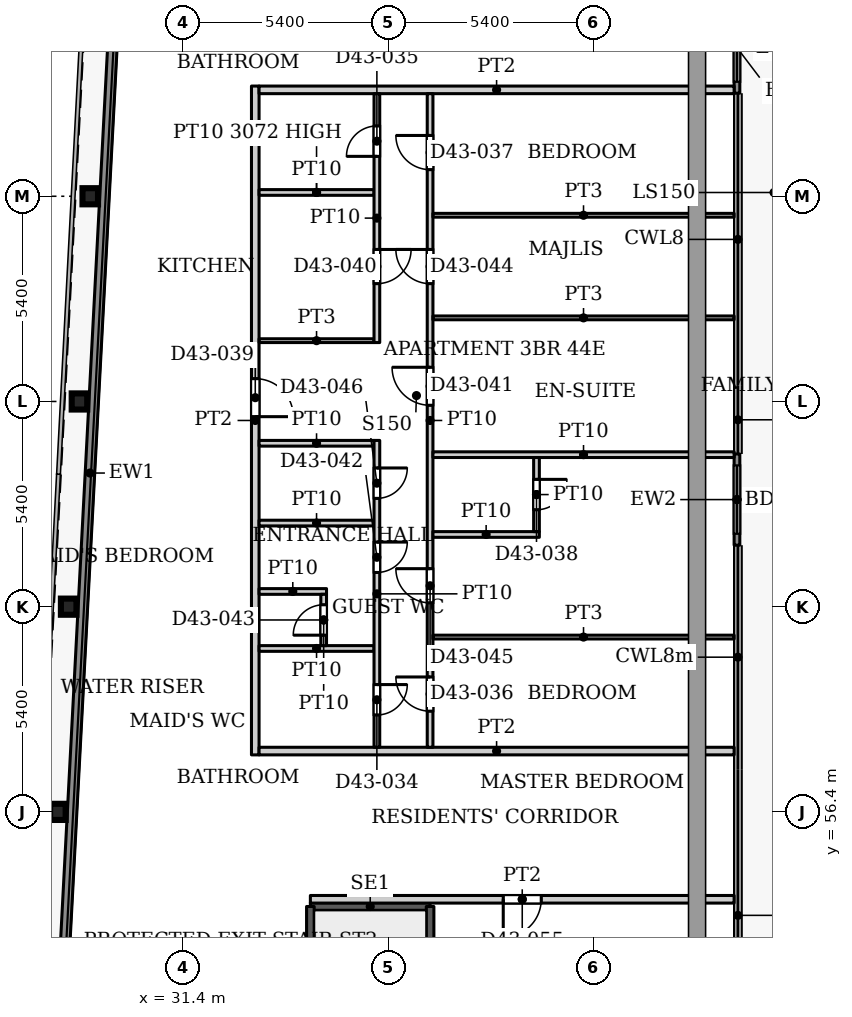
"""IFC4 building model, lengths in metres.
Left out: names, types, materials, properties, quantities, classifications, styles, units other than length and angle.
Written with IfcOpenShell. Run it as: python <this file> out.ifc"""

import sys

from ifc_helpers import new_model, si_unit, direction, frame, frame_2d, origin, origin_2d, place, context, subcontext, project, spatial, rectangle, i_section, extrude, source, transform, mapped, element, fill, save


model = new_model("IFC4")
c1 = context("Model", 3, precision=1e-05, world=origin(), true_north=direction((0.0, 1.0)))
c2 = subcontext(c1, "Body", "Model", "MODEL_VIEW")
j1 = project(units=[si_unit("LENGTHUNIT", "METRE"), si_unit("PLANEANGLEUNIT", "RADIAN")], contexts=[c1])
p1 = place(None, origin())
s1 = spatial("IfcSite", under=j1, at=p1, CompositionType="ELEMENT")
p2 = place(p1, origin())
s2 = spatial("IfcBuilding", under=s1, at=p2, CompositionType="ELEMENT")
p3 = place(p2, frame((0.0, 0.0, 187.7)))
s3 = spatial("IfcBuildingStorey", under=s2, at=p3, CompositionType="ELEMENT", Elevation=187.7)
for number, where, z_axis, x_axis in (
    (1, (28.106, 56.4, 0.0), (0.0, 0.0, 1.0), (1.0, 0.0, 0.0)),
    (2, (28.39, 61.8, 0.0), (0.0, 0.0, 1.0), (1.0, 0.0, 0.0)),
    (3, (28.674, 67.2, 0.0), (0.0, 0.0, 1.0), (1.0, 0.0, 0.0)),
    (4, (28.958, 72.6, 0.0), (0.0, 0.0, 1.0), (1.0, 0.0, 0.0)),
):
    element("IfcColumn", number, at=place(p3, frame(where, z_axis=z_axis, x_axis=x_axis)), inside=s3, PredefinedType="COLUMN", context=c2, shape_type="SweptSolid", body=[
        extrude(i_section(OverallWidth=0.409, OverallDepth=0.425, WebThickness=0.033, FlangeThickness=0.052, FilletRadius=0.013, at=origin_2d()), origin(), (0.0, 0.0, 1.0), 3.9),
    ])
p4 = place(p3, frame((27.195, 31.969, 0.0), z_axis=(0.0, 0.0, 1.0), x_axis=(0.052554995867, 0.998618031286, 0.0)))
e5 = element("IfcWall", 5, at=p4, inside=s3, PredefinedType="SOLIDWALL", context=c2, shape_type="SweptSolid", body=[
    extrude(rectangle(XDim=66.787, YDim=0.25, at=frame_2d((33.394, 0.0))), origin(), (0.0, 0.0, 1.0), 3.75),
])
p5 = place(p3, frame((45.975, 77.712, 0.0), z_axis=(0.0, 0.0, 1.0), x_axis=(0.0, -1.0, 0.0)))
e6 = element("IfcWall", 6, at=p5, inside=s3, PredefinedType="SOLIDWALL", context=c2, shape_type="SweptSolid", body=[
    extrude(rectangle(XDim=2.4, YDim=0.15, at=frame_2d((1.2, 0.0))), origin(), (0.0, 0.0, 1.0), 3.75),
])
p6 = place(p5, frame((0.3, 0.0, 0.0)))
e7 = element("IfcOpeningElement", 7, at=p6, cuts=e6, PredefinedType="OPENING", context=c2, shape_type="SweptSolid", body=[
    extrude(rectangle(XDim=1.8, YDim=2.4, at=frame_2d((0.9, 1.2))), frame((0.0, 0.085, 0.0), z_axis=(0.0, -1.0, 0.0), x_axis=(1.0, 0.0, 0.0)), (0.0, 0.0, 1.0), 0.17),
])
p7 = place(p3, frame((45.975, 65.818, 0.0), z_axis=(0.0, 0.0, 1.0), x_axis=(0.0, -1.0, 0.0)))
e8 = element("IfcWall", 8, at=p7, inside=s3, PredefinedType="SOLIDWALL", context=c2, shape_type="SweptSolid", body=[
    extrude(rectangle(XDim=2.4, YDim=0.15, at=frame_2d((1.2, 0.0))), origin(), (0.0, 0.0, 1.0), 3.75),
])
p8 = place(p7, frame((0.3, 0.0, 0.0)))
e9 = element("IfcOpeningElement", 9, at=p8, cuts=e8, PredefinedType="OPENING", context=c2, shape_type="SweptSolid", body=[
    extrude(rectangle(XDim=1.8, YDim=2.4, at=frame_2d((0.9, 1.2))), frame((0.0, 0.085, 0.0), z_axis=(0.0, -1.0, 0.0), x_axis=(1.0, 0.0, 0.0)), (0.0, 0.0, 1.0), 0.17),
])
p9 = place(p3, frame((34.75, 53.91, 0.0), z_axis=(0.0, 0.0, 1.0), x_axis=(1.0, 0.0, 0.0)))
e10 = element("IfcWall", 10, at=p9, inside=s3, PredefinedType="SHEAR", context=c2, shape_type="SweptSolid", body=[
    extrude(rectangle(XDim=3.15, YDim=0.2, at=frame_2d((1.575, 0.0))), origin(), (0.0, 0.0, 1.0), 3.9),
])
p10 = place(p3, frame((34.75, 47.5, 0.0), z_axis=(0.0, 0.0, 1.0), x_axis=(0.0, 1.0, 0.0)))
e11 = element("IfcWall", 11, at=p10, inside=s3, PredefinedType="SHEAR", context=c2, shape_type="SweptSolid", body=[
    extrude(rectangle(XDim=6.41, YDim=0.2, at=frame_2d((3.205, 0.0))), origin(), (0.0, 0.0, 1.0), 3.9),
])
p11 = place(p3, frame((37.9, 44.75, 0.0), z_axis=(0.0, 0.0, 1.0), x_axis=(0.0, 1.0, 0.0)))
e12 = element("IfcWall", 12, at=p11, inside=s3, PredefinedType="SHEAR", context=c2, shape_type="SweptSolid", body=[
    extrude(rectangle(XDim=9.16, YDim=0.2, at=frame_2d((4.58, 0.0))), origin(), (0.0, 0.0, 1.0), 3.9),
])
p12 = place(p3, frame((33.3, 57.9, 0.0), z_axis=(0.0, 0.0, 1.0), x_axis=(0.0, 1.0, 0.0)))
e13 = element("IfcWall", 13, at=p12, inside=s3, PredefinedType="PARTITIONING", context=c2, shape_type="SweptSolid", body=[
    extrude(rectangle(XDim=17.6, YDim=0.2, at=frame_2d((8.8, 0.0))), origin(), (0.0, 0.0, 1.0), 3.6),
])
p13 = place(p12, frame((8.9, 0.0, 0.0)))
e14 = element("IfcOpeningElement", 14, at=p13, cuts=e13, PredefinedType="OPENING", context=c2, shape_type="SweptSolid", body=[
    extrude(rectangle(XDim=1.0, YDim=2.1, at=frame_2d((0.5, 1.05))), frame((0.0, 0.11, 0.0), z_axis=(0.0, -1.0, 0.0), x_axis=(1.0, 0.0, 0.0)), (0.0, 0.0, 1.0), 0.22),
])
p14 = place(p3, frame((33.4, 58.0, 0.0), z_axis=(0.0, 0.0, 1.0), x_axis=(1.0, 0.0, 0.0)))
e15 = element("IfcWall", 15, at=p14, inside=s3, PredefinedType="PARTITIONING", context=c2, shape_type="SweptSolid", body=[
    extrude(rectangle(XDim=12.5, YDim=0.2, at=frame_2d((6.25, 0.0))), origin(), (0.0, 0.0, 1.0), 3.6),
])
p15 = place(p3, frame((33.4, 60.7, 0.0), z_axis=(0.0, 0.0, 1.0), x_axis=(1.0, 0.0, 0.0)))
e16 = element("IfcWall", 16, at=p15, inside=s3, PredefinedType="PARTITIONING", context=c2, shape_type="SweptSolid", body=[
    extrude(rectangle(XDim=3.025, YDim=0.15, at=frame_2d((1.513, 0.0))), origin(), (0.0, 0.0, 1.0), 3.6),
])
p16 = place(p3, frame((33.4, 62.2, 0.0), z_axis=(0.0, 0.0, 1.0), x_axis=(1.0, 0.0, 0.0)))
e17 = element("IfcWall", 17, at=p16, inside=s3, PredefinedType="PARTITIONING", context=c2, shape_type="SweptSolid", body=[
    extrude(rectangle(XDim=1.775, YDim=0.15, at=frame_2d((0.888, 0.0))), origin(), (0.0, 0.0, 1.0), 3.6),
])
for number, where, z_axis, x_axis in (
    (18, (33.4, 64.0, 0.0), (0.0, 0.0, 1.0), (1.0, 0.0, 0.0)),
    (19, (33.4, 66.1, 0.0), (0.0, 0.0, 1.0), (1.0, 0.0, 0.0)),
):
    element("IfcWall", number, at=place(p3, frame(where, z_axis=z_axis, x_axis=x_axis)), inside=s3, PredefinedType="PARTITIONING", context=c2, shape_type="SweptSolid", body=[
        extrude(rectangle(XDim=3.025, YDim=0.15, at=frame_2d((1.513, 0.0))), origin(), (0.0, 0.0, 1.0), 3.6),
    ])
p17 = place(p3, frame((33.4, 68.8, 0.0), z_axis=(0.0, 0.0, 1.0), x_axis=(1.0, 0.0, 0.0)))
e20 = element("IfcWall", 20, at=p17, inside=s3, PredefinedType="PARTITIONING", context=c2, shape_type="SweptSolid", body=[
    extrude(rectangle(XDim=3.025, YDim=0.1, at=frame_2d((1.513, 0.0))), origin(), (0.0, 0.0, 1.0), 3.6),
])
p18 = place(p3, frame((33.4, 72.7, 0.0), z_axis=(0.0, 0.0, 1.0), x_axis=(1.0, 0.0, 0.0)))
e21 = element("IfcWall", 21, at=p18, inside=s3, PredefinedType="PARTITIONING", context=c2, shape_type="SweptSolid", body=[
    extrude(rectangle(XDim=3.025, YDim=0.15, at=frame_2d((1.513, 0.0))), origin(), (0.0, 0.0, 1.0), 3.072),
])
p19 = place(p3, frame((33.4, 75.4, 0.0), z_axis=(0.0, 0.0, 1.0), x_axis=(1.0, 0.0, 0.0)))
e22 = element("IfcWall", 22, at=p19, inside=s3, PredefinedType="PARTITIONING", context=c2, shape_type="SweptSolid", body=[
    extrude(rectangle(XDim=12.5, YDim=0.2, at=frame_2d((6.25, 0.0))), origin(), (0.0, 0.0, 1.0), 3.6),
])
p20 = place(p3, frame((34.75, 54.1, 0.0), z_axis=(0.0, 0.0, 1.0), x_axis=(1.0, 0.0, 0.0)))
e23 = element("IfcWall", 23, at=p20, inside=s3, PredefinedType="PARTITIONING", context=c2, shape_type="SweptSolid", body=[
    extrude(rectangle(XDim=11.15, YDim=0.2, at=frame_2d((5.575, 0.0))), origin(), (0.0, 0.0, 1.0), 3.6),
])
p21 = place(p20, frame((5.075, 0.0, 0.0)))
e24 = element("IfcOpeningElement", 24, at=p21, cuts=e23, PredefinedType="OPENING", context=c2, shape_type="SweptSolid", body=[
    extrude(rectangle(XDim=1.0, YDim=2.1, at=frame_2d((0.5, 1.05))), frame((0.0, 0.11, 0.0), z_axis=(0.0, -1.0, 0.0), x_axis=(1.0, 0.0, 0.0)), (0.0, 0.0, 1.0), 0.22),
])
p22 = place(p3, frame((35.1, 60.775, 0.0), z_axis=(0.0, 0.0, 1.0), x_axis=(0.0, 1.0, 0.0)))
e25 = element("IfcWall", 25, at=p22, inside=s3, PredefinedType="PARTITIONING", context=c2, shape_type="SweptSolid", body=[
    extrude(rectangle(XDim=1.35, YDim=0.15, at=frame_2d((0.675, 0.0))), origin(), (0.0, 0.0, 1.0), 3.6),
])
p23 = place(p22, frame((0.275, 0.0, 0.0)))
e26 = element("IfcOpeningElement", 26, at=p23, cuts=e25, PredefinedType="OPENING", context=c2, shape_type="SweptSolid", body=[
    extrude(rectangle(XDim=0.8, YDim=2.1, at=frame_2d((0.4, 1.05))), frame((0.0, 0.085, 0.0), z_axis=(0.0, -1.0, 0.0), x_axis=(1.0, 0.0, 0.0)), (0.0, 0.0, 1.0), 0.17),
])
p24 = place(p3, frame((36.5, 58.1, 0.0), z_axis=(0.0, 0.0, 1.0), x_axis=(0.0, 1.0, 0.0)))
e27 = element("IfcWall", 27, at=p24, inside=s3, PredefinedType="PARTITIONING", context=c2, shape_type="SweptSolid", body=[
    extrude(rectangle(XDim=8.075, YDim=0.15, at=frame_2d((4.038, 0.0))), origin(), (0.0, 0.0, 1.0), 3.6),
])
p25 = place(p24, frame((0.85, 0.0, 0.0)))
e28 = element("IfcOpeningElement", 28, at=p25, cuts=e27, PredefinedType="OPENING", context=c2, shape_type="SweptSolid", body=[
    extrude(rectangle(XDim=0.8, YDim=2.1, at=frame_2d((0.4, 1.05))), frame((0.0, 0.085, 0.0), z_axis=(0.0, -1.0, 0.0), x_axis=(1.0, 0.0, 0.0)), (0.0, 0.0, 1.0), 0.17),
])
p26 = place(p24, frame((4.6, 0.0, 0.0)))
e29 = element("IfcOpeningElement", 29, at=p26, cuts=e27, PredefinedType="OPENING", context=c2, shape_type="SweptSolid", body=[
    extrude(rectangle(XDim=0.8, YDim=2.1, at=frame_2d((0.4, 1.05))), frame((0.0, 0.085, 0.0), z_axis=(0.0, -1.0, 0.0), x_axis=(1.0, 0.0, 0.0)), (0.0, 0.0, 1.0), 0.17),
])
p27 = place(p24, frame((6.55, 0.0, 0.0)))
e30 = element("IfcOpeningElement", 30, at=p27, cuts=e27, PredefinedType="OPENING", context=c2, shape_type="SweptSolid", body=[
    extrude(rectangle(XDim=0.8, YDim=2.1, at=frame_2d((0.4, 1.05))), frame((0.0, 0.085, 0.0), z_axis=(0.0, -1.0, 0.0), x_axis=(1.0, 0.0, 0.0)), (0.0, 0.0, 1.0), 0.17),
])
p28 = place(p3, frame((36.5, 68.75, 0.0), z_axis=(0.0, 0.0, 1.0), x_axis=(0.0, 1.0, 0.0)))
e31 = element("IfcWall", 31, at=p28, inside=s3, PredefinedType="PARTITIONING", context=c2, shape_type="SweptSolid", body=[
    extrude(rectangle(XDim=6.55, YDim=0.15, at=frame_2d((3.275, 0.0))), origin(), (0.0, 0.0, 1.0), 3.6),
])
p29 = place(p28, frame((4.9, 0.0, 0.0)))
e32 = element("IfcOpeningElement", 32, at=p29, cuts=e31, PredefinedType="OPENING", context=c2, shape_type="SweptSolid", body=[
    extrude(rectangle(XDim=0.8, YDim=2.1, at=frame_2d((0.4, 1.05))), frame((0.0, 0.085, 0.0), z_axis=(0.0, -1.0, 0.0), x_axis=(1.0, 0.0, 0.0)), (0.0, 0.0, 1.0), 0.17),
])
p30 = place(p28, frame((1.55, 0.0, 0.0)))
e33 = element("IfcOpeningElement", 33, at=p30, cuts=e31, PredefinedType="OPENING", context=c2, shape_type="SweptSolid", body=[
    extrude(rectangle(XDim=0.9, YDim=2.1, at=frame_2d((0.45, 1.05))), frame((0.0, 0.085, 0.0), z_axis=(0.0, -1.0, 0.0), x_axis=(1.0, 0.0, 0.0)), (0.0, 0.0, 1.0), 0.17),
])
p31 = place(p3, frame((37.9, 58.1, 0.0), z_axis=(0.0, 0.0, 1.0), x_axis=(0.0, 1.0, 0.0)))
e34 = element("IfcWall", 34, at=p31, inside=s3, PredefinedType="PARTITIONING", context=c2, shape_type="SweptSolid", body=[
    extrude(rectangle(XDim=17.2, YDim=0.15, at=frame_2d((8.6, 0.0))), origin(), (0.0, 0.0, 1.0), 3.6),
])
p32 = place(p31, frame((0.95, 0.0, 0.0)))
e35 = element("IfcOpeningElement", 35, at=p32, cuts=e34, PredefinedType="OPENING", context=c2, shape_type="SweptSolid", body=[
    extrude(rectangle(XDim=0.9, YDim=2.1, at=frame_2d((0.45, 1.05))), frame((0.0, 0.085, 0.0), z_axis=(0.0, -1.0, 0.0), x_axis=(1.0, 0.0, 0.0)), (0.0, 0.0, 1.0), 0.17),
])
p33 = place(p31, frame((15.2, 0.0, 0.0)))
e36 = element("IfcOpeningElement", 36, at=p33, cuts=e34, PredefinedType="OPENING", context=c2, shape_type="SweptSolid", body=[
    extrude(rectangle(XDim=0.9, YDim=2.1, at=frame_2d((0.45, 1.05))), frame((0.0, 0.085, 0.0), z_axis=(0.0, -1.0, 0.0), x_axis=(1.0, 0.0, 0.0)), (0.0, 0.0, 1.0), 0.17),
])
p34 = place(p31, frame((9.0, 0.0, 0.0)))
e37 = element("IfcOpeningElement", 37, at=p34, cuts=e34, PredefinedType="OPENING", context=c2, shape_type="SweptSolid", body=[
    extrude(rectangle(XDim=1.0, YDim=2.1, at=frame_2d((0.5, 1.05))), frame((0.0, 0.085, 0.0), z_axis=(0.0, -1.0, 0.0), x_axis=(1.0, 0.0, 0.0)), (0.0, 0.0, 1.0), 0.17),
])
p35 = place(p31, frame((12.2, 0.0, 0.0)))
e38 = element("IfcOpeningElement", 38, at=p35, cuts=e34, PredefinedType="OPENING", context=c2, shape_type="SweptSolid", body=[
    extrude(rectangle(XDim=0.9, YDim=2.1, at=frame_2d((0.45, 1.05))), frame((0.0, 0.085, 0.0), z_axis=(0.0, -1.0, 0.0), x_axis=(1.0, 0.0, 0.0)), (0.0, 0.0, 1.0), 0.17),
])
p36 = place(p31, frame((3.8, 0.0, 0.0)))
e39 = element("IfcOpeningElement", 39, at=p36, cuts=e34, PredefinedType="OPENING", context=c2, shape_type="SweptSolid", body=[
    extrude(rectangle(XDim=0.9, YDim=2.1, at=frame_2d((0.45, 1.05))), frame((0.0, 0.085, 0.0), z_axis=(0.0, -1.0, 0.0), x_axis=(1.0, 0.0, 0.0)), (0.0, 0.0, 1.0), 0.17),
])
p37 = place(p3, frame((37.975, 61.0, 0.0), z_axis=(0.0, 0.0, 1.0), x_axis=(1.0, 0.0, 0.0)))
e40 = element("IfcWall", 40, at=p37, inside=s3, PredefinedType="PARTITIONING", context=c2, shape_type="SweptSolid", body=[
    extrude(rectangle(XDim=7.925, YDim=0.1, at=frame_2d((3.962, 0.0))), origin(), (0.0, 0.0, 1.0), 3.6),
])
p38 = place(p3, frame((37.975, 63.7, 0.0), z_axis=(0.0, 0.0, 1.0), x_axis=(1.0, 0.0, 0.0)))
e41 = element("IfcWall", 41, at=p38, inside=s3, PredefinedType="PARTITIONING", context=c2, shape_type="SweptSolid", body=[
    extrude(rectangle(XDim=2.8, YDim=0.15, at=frame_2d((1.4, 0.0))), origin(), (0.0, 0.0, 1.0), 3.6),
])
p39 = place(p3, frame((37.975, 65.8, 0.0), z_axis=(0.0, 0.0, 1.0), x_axis=(1.0, 0.0, 0.0)))
e42 = element("IfcWall", 42, at=p39, inside=s3, PredefinedType="PARTITIONING", context=c2, shape_type="SweptSolid", body=[
    extrude(rectangle(XDim=7.925, YDim=0.15, at=frame_2d((3.962, 0.0))), origin(), (0.0, 0.0, 1.0), 3.6),
])
for number, where, z_axis, x_axis in (
    (43, (37.975, 69.4, 0.0), (0.0, 0.0, 1.0), (1.0, 0.0, 0.0)),
    (44, (37.975, 72.1, 0.0), (0.0, 0.0, 1.0), (1.0, 0.0, 0.0)),
):
    element("IfcWall", number, at=place(p3, frame(where, z_axis=z_axis, x_axis=x_axis)), inside=s3, PredefinedType="PARTITIONING", context=c2, shape_type="SweptSolid", body=[
        extrude(rectangle(XDim=7.925, YDim=0.1, at=frame_2d((3.962, 0.0))), origin(), (0.0, 0.0, 1.0), 3.6),
    ])
p40 = place(p3, frame((40.7, 63.775, 0.0), z_axis=(0.0, 0.0, 1.0), x_axis=(0.0, 1.0, 0.0)))
e45 = element("IfcWall", 45, at=p40, inside=s3, PredefinedType="PARTITIONING", context=c2, shape_type="SweptSolid", body=[
    extrude(rectangle(XDim=1.95, YDim=0.15, at=frame_2d((0.975, 0.0))), origin(), (0.0, 0.0, 1.0), 3.6),
])
p41 = place(p40, frame((0.575, 0.0, 0.0)))
e46 = element("IfcOpeningElement", 46, at=p41, cuts=e45, PredefinedType="OPENING", context=c2, shape_type="SweptSolid", body=[
    extrude(rectangle(XDim=0.8, YDim=2.1, at=frame_2d((0.4, 1.05))), frame((0.0, 0.085, 0.0), z_axis=(0.0, -1.0, 0.0), x_axis=(1.0, 0.0, 0.0)), (0.0, 0.0, 1.0), 0.17),
])
m1 = source(origin(), c2, "Body", "SweptSolid", [
    extrude(rectangle(XDim=1.8, YDim=2.4, at=frame_2d((0.9, 1.2))), frame((0.0, 0.025, 0.0), z_axis=(0.0, -1.0, 0.0), x_axis=(1.0, 0.0, 0.0)), (0.0, 0.0, 1.0), 0.05),
])
p42 = place(p6, origin())
e47 = element("IfcDoor", 47, at=p42, inside=s3, OperationType="SLIDING_TO_LEFT", PredefinedType="DOOR", context=c2, shape_type="MappedRepresentation", body=[
    mapped(m1, transform((0.0, 0.0, 0.0), x_axis=(1.0, 0.0, 0.0), y_axis=(0.0, 1.0, 0.0), z_axis=(0.0, 0.0, 1.0), scale=1.0)),
])
fill(e7, e47)
p43 = place(p8, origin())
e48 = element("IfcDoor", 48, at=p43, inside=s3, OperationType="SLIDING_TO_LEFT", PredefinedType="DOOR", context=c2, shape_type="MappedRepresentation", body=[
    mapped(m1, transform((0.0, 0.0, 0.0), x_axis=(1.0, 0.0, 0.0), y_axis=(0.0, 1.0, 0.0), z_axis=(0.0, 0.0, 1.0), scale=1.0)),
])
fill(e9, e48)
m2 = source(origin(), c2, "Body", "SweptSolid", [
    extrude(rectangle(XDim=0.8, YDim=2.1, at=frame_2d((0.4, 1.05))), frame((0.0, 0.025, 0.0), z_axis=(0.0, -1.0, 0.0), x_axis=(1.0, 0.0, 0.0)), (0.0, 0.0, 1.0), 0.05),
])
p44 = place(p25, origin())
e49 = element("IfcDoor", 49, at=p44, inside=s3, OperationType="SINGLE_SWING_RIGHT", PredefinedType="DOOR", context=c2, shape_type="MappedRepresentation", body=[
    mapped(m2, transform((0.0, 0.0, 0.0), x_axis=(1.0, 0.0, 0.0), y_axis=(0.0, 1.0, 0.0), z_axis=(0.0, 0.0, 1.0), scale=1.0)),
])
fill(e28, e49)
p45 = place(p29, origin())
e50 = element("IfcDoor", 50, at=p45, inside=s3, OperationType="SINGLE_SWING_LEFT", PredefinedType="DOOR", context=c2, shape_type="MappedRepresentation", body=[
    mapped(m2, transform((0.0, 0.0, 0.0), x_axis=(1.0, 0.0, 0.0), y_axis=(0.0, 1.0, 0.0), z_axis=(0.0, 0.0, 1.0), scale=1.0)),
])
fill(e32, e50)
m3 = source(origin(), c2, "Body", "SweptSolid", [
    extrude(rectangle(XDim=0.9, YDim=2.1, at=frame_2d((0.45, 1.05))), frame((0.0, 0.025, 0.0), z_axis=(0.0, -1.0, 0.0), x_axis=(1.0, 0.0, 0.0)), (0.0, 0.0, 1.0), 0.05),
])
p46 = place(p32, origin())
e51 = element("IfcDoor", 51, at=p46, inside=s3, OperationType="SINGLE_SWING_LEFT", PredefinedType="DOOR", context=c2, shape_type="MappedRepresentation", body=[
    mapped(m3, transform((0.0, 0.0, 0.0), x_axis=(1.0, 0.0, 0.0), y_axis=(0.0, 1.0, 0.0), z_axis=(0.0, 0.0, 1.0), scale=1.0)),
])
fill(e35, e51)
p47 = place(p33, origin())
e52 = element("IfcDoor", 52, at=p47, inside=s3, OperationType="SINGLE_SWING_LEFT", PredefinedType="DOOR", context=c2, shape_type="MappedRepresentation", body=[
    mapped(m3, transform((0.0, 0.0, 0.0), x_axis=(1.0, 0.0, 0.0), y_axis=(0.0, 1.0, 0.0), z_axis=(0.0, 0.0, 1.0), scale=1.0)),
])
fill(e36, e52)
p48 = place(p41, origin())
e53 = element("IfcDoor", 53, at=p48, inside=s3, OperationType="SINGLE_SWING_RIGHT", PredefinedType="DOOR", context=c2, shape_type="MappedRepresentation", body=[
    mapped(m2, transform((0.0, 0.0, 0.0), x_axis=(1.0, 0.0, 0.0), y_axis=(0.0, 1.0, 0.0), z_axis=(0.0, 0.0, 1.0), scale=1.0)),
])
fill(e46, e53)
m4 = source(origin(), c2, "Body", "SweptSolid", [
    extrude(rectangle(XDim=1.0, YDim=2.1, at=frame_2d((0.5, 1.05))), frame((0.0, 0.025, 0.0), z_axis=(0.0, -1.0, 0.0), x_axis=(1.0, 0.0, 0.0)), (0.0, 0.0, 1.0), 0.05),
])
p49 = place(p13, origin())
e54 = element("IfcDoor", 54, at=p49, inside=s3, OperationType="SINGLE_SWING_RIGHT", PredefinedType="DOOR", context=c2, shape_type="MappedRepresentation", body=[
    mapped(m4, transform((0.0, 0.0, 0.0), x_axis=(1.0, 0.0, 0.0), y_axis=(0.0, 1.0, 0.0), z_axis=(0.0, 0.0, 1.0), scale=1.0)),
])
fill(e14, e54)
p50 = place(p30, origin())
e55 = element("IfcDoor", 55, at=p50, inside=s3, OperationType="SINGLE_SWING_RIGHT", PredefinedType="DOOR", context=c2, shape_type="MappedRepresentation", body=[
    mapped(m3, transform((0.0, 0.0, 0.0), x_axis=(1.0, 0.0, 0.0), y_axis=(0.0, 1.0, 0.0), z_axis=(0.0, 0.0, 1.0), scale=1.0)),
])
fill(e33, e55)
m5 = source(origin(), c2, "Body", "SweptSolid", [
    extrude(rectangle(XDim=1.0, YDim=2.1, at=frame_2d((0.5, 1.05))), frame((0.0, 0.025, 0.0), z_axis=(0.0, -1.0, 0.0), x_axis=(1.0, 0.0, 0.0)), (0.0, 0.0, 1.0), 0.05),
])
p51 = place(p34, origin())
e56 = element("IfcDoor", 56, at=p51, inside=s3, OperationType="SINGLE_SWING_LEFT", PredefinedType="DOOR", context=c2, shape_type="MappedRepresentation", body=[
    mapped(m5, transform((0.0, 0.0, 0.0), x_axis=(1.0, 0.0, 0.0), y_axis=(0.0, 1.0, 0.0), z_axis=(0.0, 0.0, 1.0), scale=1.0)),
])
fill(e37, e56)
p52 = place(p26, origin())
e57 = element("IfcDoor", 57, at=p52, inside=s3, OperationType="SINGLE_SWING_RIGHT", PredefinedType="DOOR", context=c2, shape_type="MappedRepresentation", body=[
    mapped(m2, transform((0.0, 0.0, 0.0), x_axis=(1.0, 0.0, 0.0), y_axis=(0.0, 1.0, 0.0), z_axis=(0.0, 0.0, 1.0), scale=1.0)),
])
fill(e29, e57)
p53 = place(p23, origin())
e58 = element("IfcDoor", 58, at=p53, inside=s3, OperationType="SINGLE_SWING_LEFT", PredefinedType="DOOR", context=c2, shape_type="MappedRepresentation", body=[
    mapped(m2, transform((0.0, 0.0, 0.0), x_axis=(1.0, 0.0, 0.0), y_axis=(0.0, 1.0, 0.0), z_axis=(0.0, 0.0, 1.0), scale=1.0)),
])
fill(e26, e58)
p54 = place(p35, origin())
e59 = element("IfcDoor", 59, at=p54, inside=s3, OperationType="SINGLE_SWING_LEFT", PredefinedType="DOOR", context=c2, shape_type="MappedRepresentation", body=[
    mapped(m3, transform((0.0, 0.0, 0.0), x_axis=(1.0, 0.0, 0.0), y_axis=(0.0, 1.0, 0.0), z_axis=(0.0, 0.0, 1.0), scale=1.0)),
])
fill(e38, e59)
p55 = place(p36, origin())
e60 = element("IfcDoor", 60, at=p55, inside=s3, OperationType="SINGLE_SWING_LEFT", PredefinedType="DOOR", context=c2, shape_type="MappedRepresentation", body=[
    mapped(m3, transform((0.0, 0.0, 0.0), x_axis=(1.0, 0.0, 0.0), y_axis=(0.0, 1.0, 0.0), z_axis=(0.0, 0.0, 1.0), scale=1.0)),
])
fill(e39, e60)
p56 = place(p27, origin())
e61 = element("IfcDoor", 61, at=p56, inside=s3, OperationType="SINGLE_SWING_RIGHT", PredefinedType="DOOR", context=c2, shape_type="MappedRepresentation", body=[
    mapped(m2, transform((0.0, 0.0, 0.0), x_axis=(1.0, 0.0, 0.0), y_axis=(0.0, 1.0, 0.0), z_axis=(0.0, 0.0, 1.0), scale=1.0)),
])
fill(e30, e61)
m6 = source(origin(), c2, "Body", "SweptSolid", [
    extrude(rectangle(XDim=1.0, YDim=2.1, at=frame_2d((0.5, 1.05))), frame((0.0, 0.025, 0.0), z_axis=(0.0, -1.0, 0.0), x_axis=(1.0, 0.0, 0.0)), (0.0, 0.0, 1.0), 0.05),
])
p57 = place(p21, origin())
e62 = element("IfcDoor", 62, at=p57, inside=s3, OperationType="SINGLE_SWING_RIGHT", PredefinedType="DOOR", context=c2, shape_type="MappedRepresentation", body=[
    mapped(m6, transform((0.0, 0.0, 0.0), x_axis=(1.0, 0.0, 0.0), y_axis=(0.0, 1.0, 0.0), z_axis=(0.0, 0.0, 1.0), scale=1.0)),
])
fill(e24, e62)
save(model, sys.argv[1])
